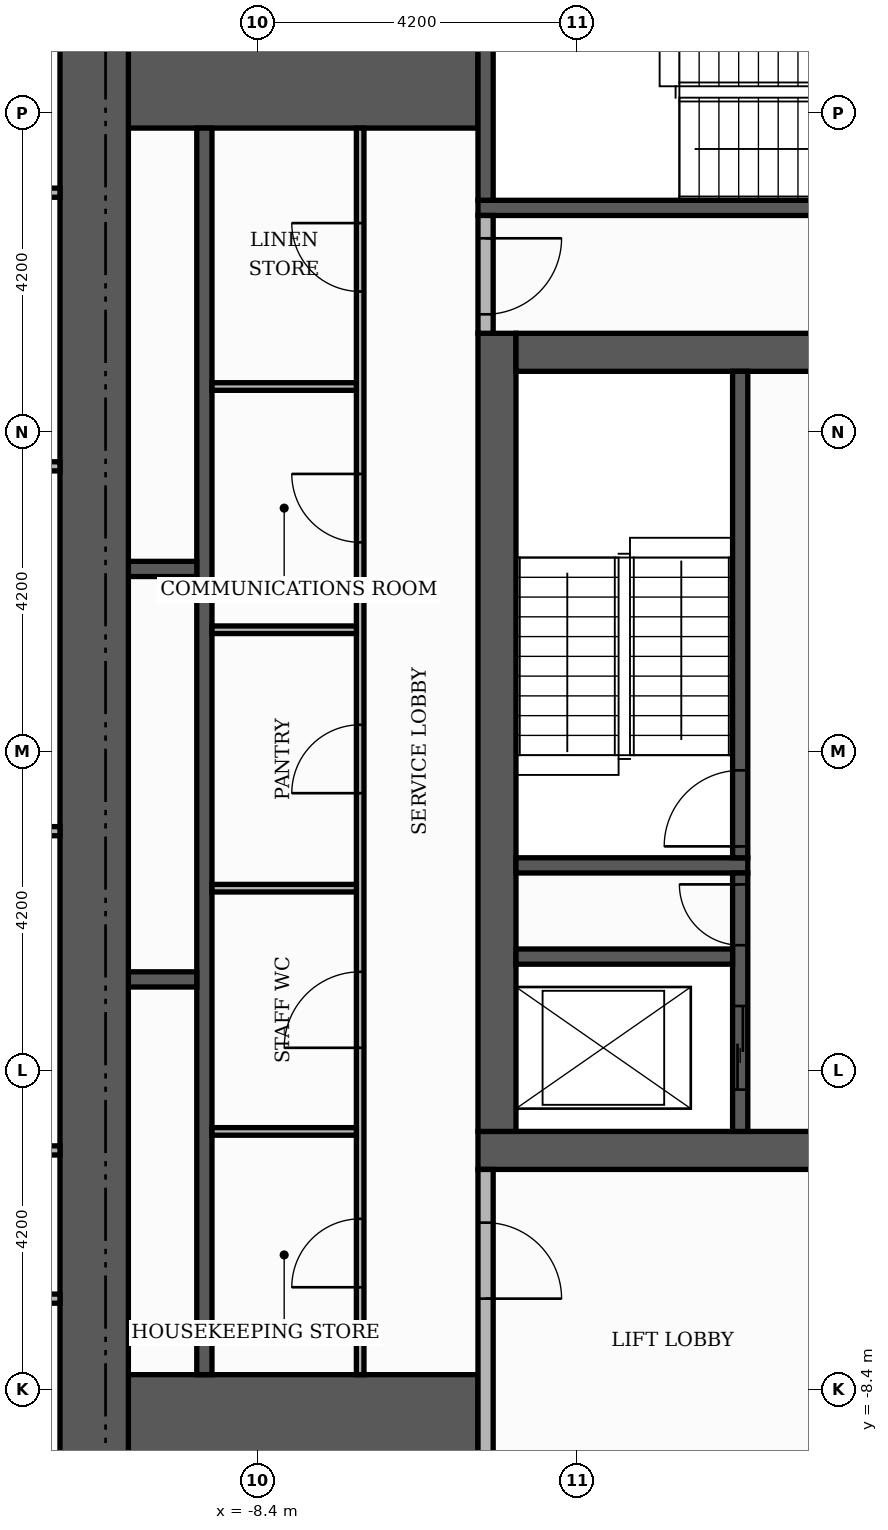
"""IFC4 building model, lengths in metres.
Left out: names, types, materials, properties, quantities, classifications, styles, units other than length and angle.
Written with IfcOpenShell. Run it as: python <this file> out.ifc"""

import sys

from ifc_helpers import new_model, si_unit, direction, frame, frame_2d, origin, place, context, subcontext, project, spatial, rectangle, extrude, element, fill, save


model = new_model("IFC4")
c1 = context("Model", 3, precision=1e-05, world=origin(), true_north=direction((0.0, 1.0)))
c2 = subcontext(c1, "Body", "Model", "MODEL_VIEW")
j1 = project(units=[si_unit("LENGTHUNIT", "METRE"), si_unit("PLANEANGLEUNIT", "RADIAN")], contexts=[c1])
p1 = place(None, origin())
s1 = spatial("IfcSite", under=j1, at=p1, CompositionType="ELEMENT")
p2 = place(p1, origin())
s2 = spatial("IfcBuilding", under=s1, at=p2, CompositionType="ELEMENT")
p3 = place(p2, frame((0.0, 0.0, 248.4)))
s3 = spatial("IfcBuildingStorey", under=s2, at=p3, CompositionType="ELEMENT", Elevation=248.4)
p4 = place(p3, frame((-5.5, -5.25, 0.0), z_axis=(0.0, 0.0, 1.0), x_axis=(1.0, 0.0, 0.0)))
e1 = element("IfcWall", 1, at=p4, inside=s3, PredefinedType="SHEAR", context=c2, shape_type="SweptSolid", body=[
    extrude(rectangle(XDim=11.0, YDim=0.5, at=frame_2d((5.5, 0.0))), origin(), (0.0, 0.0, 1.0), 3.48),
])
p5 = place(p4, frame((4.9, 0.0, 0.0)))
e2 = element("IfcOpeningElement", 2, at=p5, cuts=e1, PredefinedType="OPENING", context=c2, shape_type="SweptSolid", body=[
    extrude(rectangle(XDim=1.2, YDim=2.1, at=frame_2d((0.6, 1.05))), frame((0.0, 0.26, 0.0), z_axis=(0.0, -1.0, 0.0), x_axis=(1.0, 0.0, 0.0)), (0.0, 0.0, 1.0), 0.52),
])
p6 = place(p3, frame((-5.25, -5.0, 0.0), z_axis=(0.0, 0.0, 1.0), x_axis=(0.0, 1.0, 0.0)))
e3 = element("IfcWall", 3, at=p6, inside=s3, PredefinedType="SHEAR", context=c2, shape_type="SweptSolid", body=[
    extrude(rectangle(XDim=10.5, YDim=0.5, at=frame_2d((5.25, 0.0))), origin(), (0.0, 0.0, 1.0), 3.48),
])
p7 = place(p3, frame((-5.0, 5.25, 0.0), z_axis=(0.0, 0.0, 1.0), x_axis=(1.0, 0.0, 0.0)))
e4 = element("IfcWall", 4, at=p7, inside=s3, PredefinedType="SHEAR", context=c2, shape_type="SweptSolid", body=[
    extrude(rectangle(XDim=10.0, YDim=0.5, at=frame_2d((5.0, 0.0))), origin(), (0.0, 0.0, 1.0), 3.48),
])
p8 = place(p7, frame((4.4, 0.0, 0.0)))
e5 = element("IfcOpeningElement", 5, at=p8, cuts=e4, PredefinedType="OPENING", context=c2, shape_type="SweptSolid", body=[
    extrude(rectangle(XDim=1.2, YDim=2.1, at=frame_2d((0.6, 1.05))), frame((0.0, 0.26, 0.0), z_axis=(0.0, -1.0, 0.0), x_axis=(1.0, 0.0, 0.0)), (0.0, 0.0, 1.0), 0.52),
])
for number, where, z_axis, x_axis in (
    (6, (-10.1, -9.15, 0.0), (0.0, 0.0, 1.0), (1.0, 0.0, 0.0)),
    (7, (-10.1, 9.15, 0.0), (0.0, 0.0, 1.0), (1.0, 0.0, 0.0)),
):
    element("IfcWall", number, at=place(p3, frame(where, z_axis=z_axis, x_axis=x_axis)), inside=s3, PredefinedType="SHEAR", context=c2, shape_type="SweptSolid", body=[
        extrude(rectangle(XDim=4.6, YDim=1.9, at=frame_2d((2.3, 0.0))), origin(), (0.0, 0.0, 1.0), 3.48),
    ])
p9 = place(p3, frame((-5.0, -1.5, 0.0), z_axis=(0.0, 0.0, 1.0), x_axis=(1.0, 0.0, 0.0)))
e8 = element("IfcWall", 8, at=p9, inside=s3, PredefinedType="SHEAR", context=c2, shape_type="SweptSolid", body=[
    extrude(rectangle(XDim=3.05, YDim=0.2, at=frame_2d((1.525, 0.0))), origin(), (0.0, 0.0, 1.0), 3.48),
])
p10 = place(p3, frame((-2.05, -1.4, 0.0), z_axis=(0.0, 0.0, 1.0), x_axis=(0.0, 1.0, 0.0)))
e9 = element("IfcWall", 9, at=p10, inside=s3, PredefinedType="SHEAR", context=c2, shape_type="SweptSolid", body=[
    extrude(rectangle(XDim=6.4, YDim=0.2, at=frame_2d((3.2, 0.0))), origin(), (0.0, 0.0, 1.0), 3.48),
])
p11 = place(p10, frame((0.15, 0.0, 0.0)))
e10 = element("IfcOpeningElement", 10, at=p11, cuts=e9, PredefinedType="OPENING", context=c2, shape_type="SweptSolid", body=[
    extrude(rectangle(XDim=1.0, YDim=2.1, at=frame_2d((0.5, 1.05))), frame((0.0, 0.11, 0.0), z_axis=(0.0, -1.0, 0.0), x_axis=(1.0, 0.0, 0.0)), (0.0, 0.0, 1.0), 0.22),
])
p12 = place(p3, frame((-5.5, 7.15, 0.0), z_axis=(0.0, 0.0, 1.0), x_axis=(1.0, 0.0, 0.0)))
e11 = element("IfcWall", 11, at=p12, inside=s3, PredefinedType="SHEAR", context=c2, shape_type="SweptSolid", body=[
    extrude(rectangle(XDim=6.8, YDim=0.2, at=frame_2d((3.4, 0.0))), origin(), (0.0, 0.0, 1.0), 3.48),
])
p13 = place(p3, frame((-5.4, 7.25, 0.0), z_axis=(0.0, 0.0, 1.0), x_axis=(0.0, 1.0, 0.0)))
e12 = element("IfcWall", 12, at=p13, inside=s3, PredefinedType="SHEAR", context=c2, shape_type="SweptSolid", body=[
    extrude(rectangle(XDim=2.85, YDim=0.2, at=frame_2d((1.425, 0.0))), origin(), (0.0, 0.0, 1.0), 3.48),
])
p14 = place(p3, frame((-9.1, -8.2, 0.0), z_axis=(0.0, 0.0, 1.0), x_axis=(0.0, 1.0, 0.0)))
e13 = element("IfcWall", 13, at=p14, inside=s3, PredefinedType="SHEAR", context=c2, shape_type="SweptSolid", body=[
    extrude(rectangle(XDim=16.4, YDim=0.2, at=frame_2d((8.2, 0.0))), origin(), (0.0, 0.0, 1.0), 3.48),
])
p15 = place(p3, frame((-2.05, -5.0, 0.0), z_axis=(0.0, 0.0, 1.0), x_axis=(0.0, 1.0, 0.0)))
e14 = element("IfcWall", 14, at=p15, inside=s3, PredefinedType="SHEAR", context=c2, shape_type="SweptSolid", body=[
    extrude(rectangle(XDim=3.4, YDim=0.2, at=frame_2d((1.7, 0.0))), origin(), (0.0, 0.0, 1.0), 3.48),
])
p16 = place(p15, frame((0.55, 0.0, 0.0)))
e15 = element("IfcOpeningElement", 15, at=p16, cuts=e14, PredefinedType="OPENING", context=c2, shape_type="SweptSolid", body=[
    extrude(rectangle(XDim=1.1, YDim=2.1, at=frame_2d((0.55, 1.05))), frame((0.0, 0.11, 0.0), z_axis=(0.0, -1.0, 0.0), x_axis=(1.0, 0.0, 0.0)), (0.0, 0.0, 1.0), 0.22),
])
p17 = place(p15, frame((2.45, 0.0, 0.0)))
e16 = element("IfcOpeningElement", 16, at=p17, cuts=e14, PredefinedType="OPENING", context=c2, shape_type="SweptSolid", body=[
    extrude(rectangle(XDim=0.8, YDim=2.1, at=frame_2d((0.4, 1.05))), frame((0.0, 0.11, 0.0), z_axis=(0.0, -1.0, 0.0), x_axis=(1.0, 0.0, 0.0)), (0.0, 0.0, 1.0), 0.22),
])
p18 = place(p3, frame((-10.1, -3.0, 0.0), z_axis=(0.0, 0.0, 1.0), x_axis=(1.0, 0.0, 0.0)))
e17 = element("IfcWall", 17, at=p18, inside=s3, PredefinedType="SHEAR", context=c2, shape_type="SweptSolid", body=[
    extrude(rectangle(XDim=0.9, YDim=0.2, at=frame_2d((0.45, 0.0))), origin(), (0.0, 0.0, 1.0), 3.48),
])
p19 = place(p3, frame((-5.0, -2.7, 0.0), z_axis=(0.0, 0.0, 1.0), x_axis=(1.0, 0.0, 0.0)))
e18 = element("IfcWall", 18, at=p19, inside=s3, PredefinedType="SHEAR", context=c2, shape_type="SweptSolid", body=[
    extrude(rectangle(XDim=2.85, YDim=0.2, at=frame_2d((1.425, 0.0))), origin(), (0.0, 0.0, 1.0), 3.48),
])
p20 = place(p3, frame((-10.1, 2.4, 0.0), z_axis=(0.0, 0.0, 1.0), x_axis=(1.0, 0.0, 0.0)))
e19 = element("IfcWall", 19, at=p20, inside=s3, PredefinedType="SHEAR", context=c2, shape_type="SweptSolid", body=[
    extrude(rectangle(XDim=0.9, YDim=0.2, at=frame_2d((0.45, 0.0))), origin(), (0.0, 0.0, 1.0), 3.48),
])
p21 = place(p3, frame((-10.55, -10.1, 0.0), z_axis=(0.0, 0.0, 1.0), x_axis=(0.0, 1.0, 0.0)))
e20 = element("IfcWall", 20, at=p21, inside=s3, PredefinedType="SHEAR", context=c2, shape_type="SweptSolid", body=[
    extrude(rectangle(XDim=20.2, YDim=0.9, at=frame_2d((10.1, 0.0))), origin(), (0.0, 0.0, 1.0), 3.48),
])
p22 = place(p3, frame((-5.4, -10.1, 0.0), z_axis=(0.0, 0.0, 1.0), x_axis=(0.0, 1.0, 0.0)))
e21 = element("IfcWall", 21, at=p22, inside=s3, PredefinedType="PARTITIONING", context=c2, shape_type="SweptSolid", body=[
    extrude(rectangle(XDim=4.6, YDim=0.2, at=frame_2d((2.3, 0.0))), origin(), (0.0, 0.0, 1.0), 3.48),
])
p23 = place(p22, frame((2.9, 0.0, 0.0)))
e22 = element("IfcOpeningElement", 22, at=p23, cuts=e21, PredefinedType="OPENING", context=c2, shape_type="SweptSolid", body=[
    extrude(rectangle(XDim=1.0, YDim=2.1, at=frame_2d((0.5, 1.05))), frame((0.0, 0.11, 0.0), z_axis=(0.0, -1.0, 0.0), x_axis=(1.0, 0.0, 0.0)), (0.0, 0.0, 1.0), 0.22),
])
p24 = place(p3, frame((-7.05, -8.2, 0.0), z_axis=(0.0, 0.0, 1.0), x_axis=(0.0, 1.0, 0.0)))
e23 = element("IfcWall", 23, at=p24, inside=s3, PredefinedType="PARTITIONING", context=c2, shape_type="SweptSolid", body=[
    extrude(rectangle(XDim=16.4, YDim=0.1, at=frame_2d((8.2, 0.0))), origin(), (0.0, 0.0, 1.0), 3.48),
])
p25 = place(p24, frame((1.15, 0.0, 0.0)))
e24 = element("IfcOpeningElement", 24, at=p25, cuts=e23, PredefinedType="OPENING", context=c2, shape_type="SweptSolid", body=[
    extrude(rectangle(XDim=0.9, YDim=2.1, at=frame_2d((0.45, 1.05))), frame((0.0, 0.06, 0.0), z_axis=(0.0, -1.0, 0.0), x_axis=(1.0, 0.0, 0.0)), (0.0, 0.0, 1.0), 0.12),
])
p26 = place(p24, frame((4.3, 0.0, 0.0)))
e25 = element("IfcOpeningElement", 25, at=p26, cuts=e23, PredefinedType="OPENING", context=c2, shape_type="SweptSolid", body=[
    extrude(rectangle(XDim=1.0, YDim=2.1, at=frame_2d((0.5, 1.05))), frame((0.0, 0.06, 0.0), z_axis=(0.0, -1.0, 0.0), x_axis=(1.0, 0.0, 0.0)), (0.0, 0.0, 1.0), 0.12),
])
p27 = place(p24, frame((7.65, 0.0, 0.0)))
e26 = element("IfcOpeningElement", 26, at=p27, cuts=e23, PredefinedType="OPENING", context=c2, shape_type="SweptSolid", body=[
    extrude(rectangle(XDim=0.9, YDim=2.1, at=frame_2d((0.45, 1.05))), frame((0.0, 0.06, 0.0), z_axis=(0.0, -1.0, 0.0), x_axis=(1.0, 0.0, 0.0)), (0.0, 0.0, 1.0), 0.12),
])
p28 = place(p24, frame((10.95, 0.0, 0.0)))
e27 = element("IfcOpeningElement", 27, at=p28, cuts=e23, PredefinedType="OPENING", context=c2, shape_type="SweptSolid", body=[
    extrude(rectangle(XDim=0.9, YDim=2.1, at=frame_2d((0.45, 1.05))), frame((0.0, 0.06, 0.0), z_axis=(0.0, -1.0, 0.0), x_axis=(1.0, 0.0, 0.0)), (0.0, 0.0, 1.0), 0.12),
])
p29 = place(p24, frame((14.25, 0.0, 0.0)))
e28 = element("IfcOpeningElement", 28, at=p29, cuts=e23, PredefinedType="OPENING", context=c2, shape_type="SweptSolid", body=[
    extrude(rectangle(XDim=0.9, YDim=2.1, at=frame_2d((0.45, 1.05))), frame((0.0, 0.06, 0.0), z_axis=(0.0, -1.0, 0.0), x_axis=(1.0, 0.0, 0.0)), (0.0, 0.0, 1.0), 0.12),
])
for number, where, z_axis, x_axis in (
    (29, (-9.0, -5.0, 0.0), (0.0, 0.0, 1.0), (1.0, 0.0, 0.0)),
    (30, (-9.0, -1.8, 0.0), (0.0, 0.0, 1.0), (1.0, 0.0, 0.0)),
    (31, (-9.0, 1.6, 0.0), (0.0, 0.0, 1.0), (1.0, 0.0, 0.0)),
    (32, (-9.0, 4.8, 0.0), (0.0, 0.0, 1.0), (1.0, 0.0, 0.0)),
):
    element("IfcWall", number, at=place(p3, frame(where, z_axis=z_axis, x_axis=x_axis)), inside=s3, PredefinedType="PARTITIONING", context=c2, shape_type="SweptSolid", body=[
        extrude(rectangle(XDim=1.9, YDim=0.1, at=frame_2d((0.95, 0.0))), origin(), (0.0, 0.0, 1.0), 3.48),
    ])
p30 = place(p3, frame((-5.4, 5.5, 0.0), z_axis=(0.0, 0.0, 1.0), x_axis=(0.0, 1.0, 0.0)))
e33 = element("IfcWall", 33, at=p30, inside=s3, PredefinedType="PARTITIONING", context=c2, shape_type="SweptSolid", body=[
    extrude(rectangle(XDim=1.55, YDim=0.2, at=frame_2d((0.775, 0.0))), origin(), (0.0, 0.0, 1.0), 3.48),
])
p31 = place(p30, frame((0.25, 0.0, 0.0)))
e34 = element("IfcOpeningElement", 34, at=p31, cuts=e33, PredefinedType="OPENING", context=c2, shape_type="SweptSolid", body=[
    extrude(rectangle(XDim=1.0, YDim=2.1, at=frame_2d((0.5, 1.05))), frame((0.0, 0.11, 0.0), z_axis=(0.0, -1.0, 0.0), x_axis=(1.0, 0.0, 0.0)), (0.0, 0.0, 1.0), 0.22),
])
for number, where, z_axis, x_axis in (
    (35, (-18.32, -7.2, 0.0), (0.0, 0.0, 1.0), (1.0, 0.0, 0.0)),
    (36, (-18.32, -5.25, 0.0), (0.0, 0.0, 1.0), (1.0, 0.0, 0.0)),
    (37, (-18.32, -1.05, 0.0), (0.0, 0.0, 1.0), (1.0, 0.0, 0.0)),
    (38, (-18.32, 3.75, 0.0), (0.0, 0.0, 1.0), (1.0, 0.0, 0.0)),
):
    element("IfcWall", number, at=place(p3, frame(where, z_axis=z_axis, x_axis=x_axis)), inside=s3, PredefinedType="PARTITIONING", context=c2, shape_type="SweptSolid", body=[
        extrude(rectangle(XDim=7.32, YDim=0.12, at=frame_2d((3.66, 0.0))), origin(), (0.0, 0.0, 1.0), 3.48),
    ])
p32 = place(p3, frame((-18.32, 7.35, 0.0), z_axis=(0.0, 0.0, 1.0), x_axis=(1.0, 0.0, 0.0)))
e39 = element("IfcWall", 39, at=p32, inside=s3, PredefinedType="PARTITIONING", context=c2, shape_type="SweptSolid", body=[
    extrude(rectangle(XDim=7.32, YDim=0.12, at=frame_2d((3.66, 0.0))), origin(), (0.0, 0.0, 1.0), 3.48),
])
p33 = place(p32, frame((3.21, 0.0, 0.0)))
e40 = element("IfcOpeningElement", 40, at=p33, cuts=e39, PredefinedType="OPENING", context=c2, shape_type="SweptSolid", body=[
    extrude(rectangle(XDim=0.9, YDim=2.1, at=frame_2d((0.45, 1.05))), frame((0.0, 0.07, 0.0), z_axis=(0.0, -1.0, 0.0), x_axis=(1.0, 0.0, 0.0)), (0.0, 0.0, 1.0), 0.14),
])
p34 = place(p16, origin())
e41 = element("IfcDoor", 41, at=p34, inside=s3, OperationType="SLIDING_TO_LEFT", PredefinedType="DOOR", context=c2, shape_type="SweptSolid", body=[
    extrude(rectangle(XDim=1.1, YDim=2.1, at=frame_2d((0.55, 1.05))), frame((0.0, 0.025, 0.0), z_axis=(0.0, -1.0, 0.0), x_axis=(1.0, 0.0, 0.0)), (0.0, 0.0, 1.0), 0.05),
])
fill(e15, e41)
p35 = place(p11, origin())
e42 = element("IfcDoor", 42, at=p35, inside=s3, OperationType="SINGLE_SWING_LEFT", PredefinedType="DOOR", context=c2, shape_type="SweptSolid", body=[
    extrude(rectangle(XDim=1.0, YDim=2.1, at=frame_2d((0.5, 1.05))), frame((0.0, 0.025, 0.0), z_axis=(0.0, -1.0, 0.0), x_axis=(1.0, 0.0, 0.0)), (0.0, 0.0, 1.0), 0.05),
])
fill(e10, e42)
p36 = place(p17, origin())
e43 = element("IfcDoor", 43, at=p36, inside=s3, OperationType="SINGLE_SWING_RIGHT", PredefinedType="DOOR", context=c2, shape_type="SweptSolid", body=[
    extrude(rectangle(XDim=0.8, YDim=2.1, at=frame_2d((0.4, 1.05))), frame((0.0, 0.025, 0.0), z_axis=(0.0, -1.0, 0.0), x_axis=(1.0, 0.0, 0.0)), (0.0, 0.0, 1.0), 0.05),
])
fill(e16, e43)
p37 = place(p31, frame((1.0, 0.0, 0.0), z_axis=(0.0, 0.0, 1.0), x_axis=(-1.0, 0.0, 0.0)))
e44 = element("IfcDoor", 44, at=p37, inside=s3, OperationType="SINGLE_SWING_RIGHT", PredefinedType="DOOR", context=c2, shape_type="SweptSolid", body=[
    extrude(rectangle(XDim=1.0, YDim=2.1, at=frame_2d((0.5, 1.05))), frame((0.0, 0.025, 0.0), z_axis=(0.0, -1.0, 0.0), x_axis=(1.0, 0.0, 0.0)), (0.0, 0.0, 1.0), 0.05),
])
fill(e34, e44)
p38 = place(p23, frame((1.0, 0.0, 0.0), z_axis=(0.0, 0.0, 1.0), x_axis=(-1.0, 0.0, 0.0)))
e45 = element("IfcDoor", 45, at=p38, inside=s3, OperationType="SINGLE_SWING_LEFT", PredefinedType="DOOR", context=c2, shape_type="SweptSolid", body=[
    extrude(rectangle(XDim=1.0, YDim=2.1, at=frame_2d((0.5, 1.05))), frame((0.0, 0.025, 0.0), z_axis=(0.0, -1.0, 0.0), x_axis=(1.0, 0.0, 0.0)), (0.0, 0.0, 1.0), 0.05),
])
fill(e22, e45)
p39 = place(p25, origin())
e46 = element("IfcDoor", 46, at=p39, inside=s3, OperationType="SINGLE_SWING_LEFT", PredefinedType="DOOR", context=c2, shape_type="SweptSolid", body=[
    extrude(rectangle(XDim=0.9, YDim=2.1, at=frame_2d((0.45, 1.05))), frame((0.0, 0.025, 0.0), z_axis=(0.0, -1.0, 0.0), x_axis=(1.0, 0.0, 0.0)), (0.0, 0.0, 1.0), 0.05),
])
fill(e24, e46)
p40 = place(p26, origin())
e47 = element("IfcDoor", 47, at=p40, inside=s3, OperationType="SINGLE_SWING_LEFT", PredefinedType="DOOR", context=c2, shape_type="SweptSolid", body=[
    extrude(rectangle(XDim=1.0, YDim=2.1, at=frame_2d((0.5, 1.05))), frame((0.0, 0.025, 0.0), z_axis=(0.0, -1.0, 0.0), x_axis=(1.0, 0.0, 0.0)), (0.0, 0.0, 1.0), 0.05),
])
fill(e25, e47)
p41 = place(p27, origin())
e48 = element("IfcDoor", 48, at=p41, inside=s3, OperationType="SINGLE_SWING_LEFT", PredefinedType="DOOR", context=c2, shape_type="SweptSolid", body=[
    extrude(rectangle(XDim=0.9, YDim=2.1, at=frame_2d((0.45, 1.05))), frame((0.0, 0.025, 0.0), z_axis=(0.0, -1.0, 0.0), x_axis=(1.0, 0.0, 0.0)), (0.0, 0.0, 1.0), 0.05),
])
fill(e26, e48)
p42 = place(p28, origin())
e49 = element("IfcDoor", 49, at=p42, inside=s3, OperationType="SINGLE_SWING_RIGHT", PredefinedType="DOOR", context=c2, shape_type="SweptSolid", body=[
    extrude(rectangle(XDim=0.9, YDim=2.1, at=frame_2d((0.45, 1.05))), frame((0.0, 0.025, 0.0), z_axis=(0.0, -1.0, 0.0), x_axis=(1.0, 0.0, 0.0)), (0.0, 0.0, 1.0), 0.05),
])
fill(e27, e49)
p43 = place(p29, origin())
e50 = element("IfcDoor", 50, at=p43, inside=s3, OperationType="SINGLE_SWING_RIGHT", PredefinedType="DOOR", context=c2, shape_type="SweptSolid", body=[
    extrude(rectangle(XDim=0.9, YDim=2.1, at=frame_2d((0.45, 1.05))), frame((0.0, 0.025, 0.0), z_axis=(0.0, -1.0, 0.0), x_axis=(1.0, 0.0, 0.0)), (0.0, 0.0, 1.0), 0.05),
])
fill(e28, e50)
save(model, sys.argv[1])
